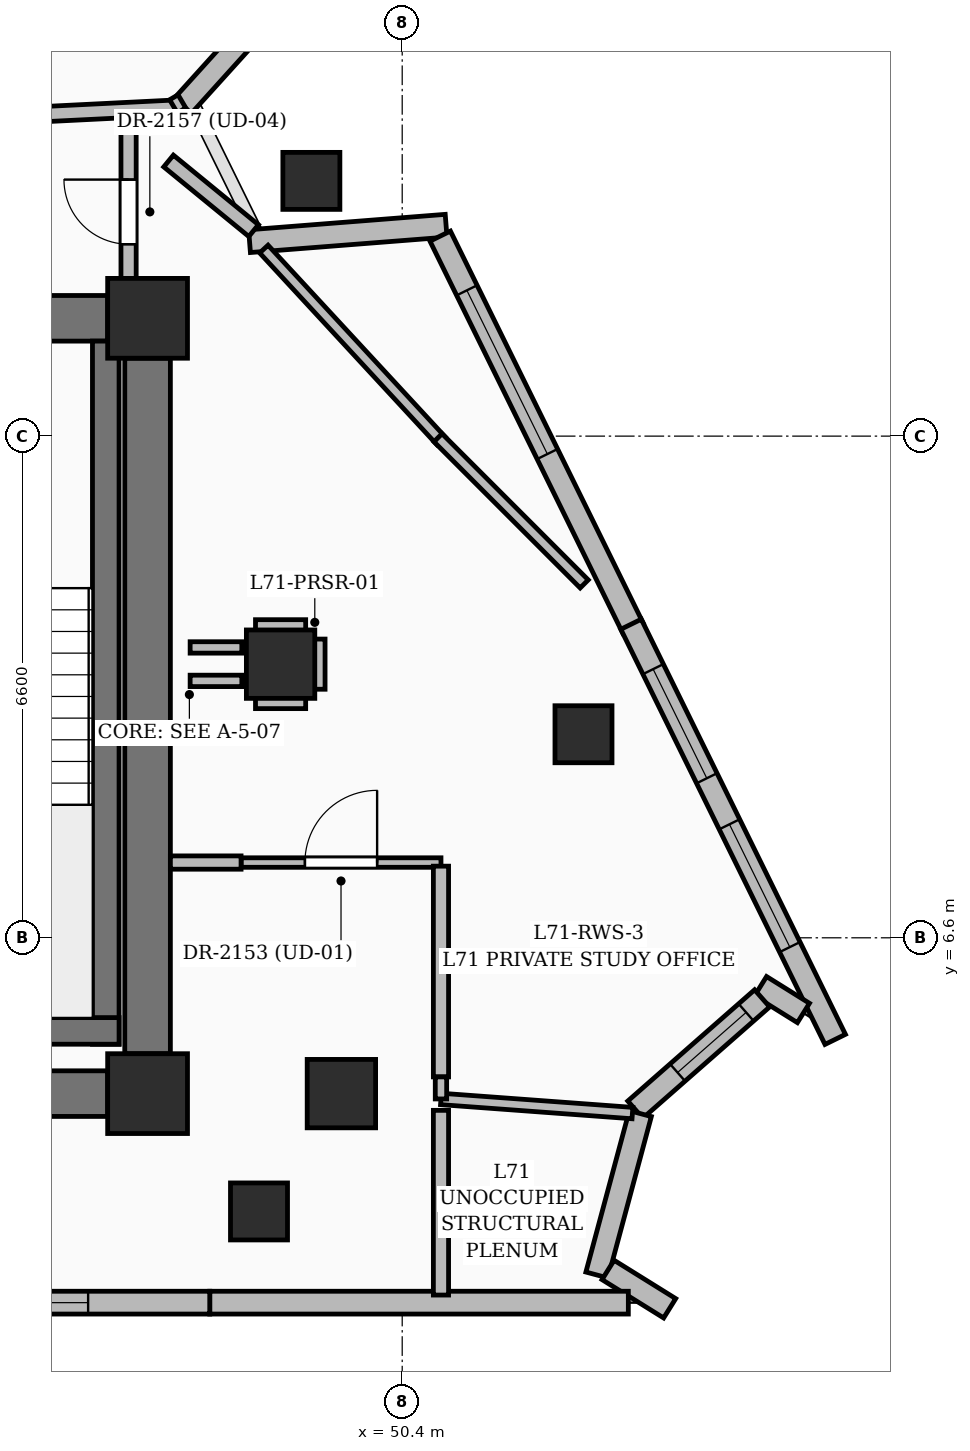
"""IFC4 building model, lengths in metres.
Left out: names, types, materials, properties, quantities, classifications, styles, units other than length and angle.
Written with IfcOpenShell. Run it as: python <this file> out.ifc"""

import sys

from ifc_helpers import new_model, si_unit, direction, frame, frame_2d, origin, origin_2d, place, context, subcontext, project, spatial, rectangle, extrude, element, fill, save


model = new_model("IFC4")
c1 = context("Model", 3, precision=1e-05, world=origin(), true_north=direction((0.0, 1.0)))
c2 = subcontext(c1, "Body", "Model", "MODEL_VIEW")
j1 = project(units=[si_unit("LENGTHUNIT", "METRE"), si_unit("PLANEANGLEUNIT", "RADIAN")], contexts=[c1])
p1 = place(None, origin())
s1 = spatial("IfcSite", under=j1, at=p1, CompositionType="ELEMENT")
p2 = place(p1, origin())
s2 = spatial("IfcBuilding", under=s1, at=p2, CompositionType="ELEMENT")
p3 = place(p2, frame((0.0, 0.0, 274.5)))
s3 = spatial("IfcBuildingStorey", under=s2, at=p3, CompositionType="ELEMENT", Elevation=274.5)
for number, where, z_axis, x_axis in (
    (1, (47.05, 4.55, 0.0), (0.0, 0.0, 1.0), (1.0, 0.0, 0.0)),
    (2, (47.05, 14.75, 0.0), (0.0, 0.0, 1.0), (1.0, 0.0, 0.0)),
):
    element("IfcColumn", number, at=place(p3, frame(where, z_axis=z_axis, x_axis=x_axis)), inside=s3, PredefinedType="COLUMN", context=c2, shape_type="SweptSolid", body=[
        extrude(rectangle(XDim=1.05, YDim=1.05, at=origin_2d()), origin(), (0.0, 0.0, 1.0), 3.75),
    ])
for number, where, z_axis, x_axis in (
    (3, (49.6, 4.55, 0.0), (0.0, 0.0, 1.0), (1.0, 0.0, 0.0)),
    (4, (48.8, 10.2, 0.0), (0.0, 0.0, 1.0), (1.0, 0.0, 0.0)),
):
    element("IfcColumn", number, at=place(p3, frame(where, z_axis=z_axis, x_axis=x_axis)), inside=s3, PredefinedType="COLUMN", context=c2, shape_type="SweptSolid", body=[
        extrude(rectangle(XDim=0.9, YDim=0.9, at=origin_2d()), origin(), (0.0, 0.0, 1.0), 3.75),
    ])
p4 = place(p3, frame((35.675, 4.55, 0.0), z_axis=(0.0, 0.0, 1.0), x_axis=(1.0, 0.0, 0.0)))
e5 = element("IfcWall", 5, at=p4, inside=s3, PredefinedType="SHEAR", context=c2, shape_type="SweptSolid", body=[
    extrude(rectangle(XDim=10.85, YDim=0.6, at=frame_2d((5.425, 0.0))), origin(), (0.0, 0.0, 1.0), 3.75),
])
p5 = place(p3, frame((35.675, 14.75, 0.0), z_axis=(0.0, 0.0, 1.0), x_axis=(1.0, 0.0, 0.0)))
e6 = element("IfcWall", 6, at=p5, inside=s3, PredefinedType="SHEAR", context=c2, shape_type="SweptSolid", body=[
    extrude(rectangle(XDim=10.85, YDim=0.6, at=frame_2d((5.425, 0.0))), origin(), (0.0, 0.0, 1.0), 3.75),
])
p6 = place(p5, frame((1.1, 0.0, 0.0)))
e7 = element("IfcOpeningElement", 7, at=p6, cuts=e6, PredefinedType="OPENING", context=c2, shape_type="SweptSolid", body=[
    extrude(rectangle(XDim=1.05, YDim=2.15, at=frame_2d((0.525, 1.075))), frame((0.0, 0.31, 0.0), z_axis=(0.0, -1.0, 0.0), x_axis=(1.0, 0.0, 0.0)), (0.0, 0.0, 1.0), 0.62),
])
p7 = place(p5, frame((8.7, 0.0, 0.0)))
e8 = element("IfcOpeningElement", 8, at=p7, cuts=e6, PredefinedType="OPENING", context=c2, shape_type="SweptSolid", body=[
    extrude(rectangle(XDim=1.05, YDim=2.15, at=frame_2d((0.525, 1.075))), frame((0.0, 0.31, 0.0), z_axis=(0.0, -1.0, 0.0), x_axis=(1.0, 0.0, 0.0)), (0.0, 0.0, 1.0), 0.62),
])
p8 = place(p5, frame((3.825, 0.0, 0.0)))
e9 = element("IfcOpeningElement", 9, at=p8, cuts=e6, PredefinedType="OPENING", context=c2, shape_type="SweptSolid", body=[
    extrude(rectangle(XDim=1.2, YDim=2.2, at=frame_2d((0.6, 1.1))), frame((0.0, 0.31, 0.0), z_axis=(0.0, -1.0, 0.0), x_axis=(1.0, 0.0, 0.0)), (0.0, 0.0, 1.0), 0.62),
])
p9 = place(p5, frame((5.825, 0.0, 0.0)))
e10 = element("IfcOpeningElement", 10, at=p9, cuts=e6, PredefinedType="OPENING", context=c2, shape_type="SweptSolid", body=[
    extrude(rectangle(XDim=1.2, YDim=2.2, at=frame_2d((0.6, 1.1))), frame((0.0, 0.31, 0.0), z_axis=(0.0, -1.0, 0.0), x_axis=(1.0, 0.0, 0.0)), (0.0, 0.0, 1.0), 0.62),
])
p10 = place(p3, frame((47.05, 5.075, 0.0), z_axis=(0.0, 0.0, 1.0), x_axis=(0.0, 1.0, 0.0)))
e11 = element("IfcWall", 11, at=p10, inside=s3, PredefinedType="SHEAR", context=c2, shape_type="SweptSolid", body=[
    extrude(rectangle(XDim=9.15, YDim=0.6, at=frame_2d((4.575, 0.0))), origin(), (0.0, 0.0, 1.0), 3.75),
])
p11 = place(p3, frame((46.5, 5.2, 0.0), z_axis=(0.0, 0.0, 1.0), x_axis=(0.0, 1.0, 0.0)))
e12 = element("IfcWall", 12, at=p11, inside=s3, PredefinedType="SOLIDWALL", context=c2, shape_type="SweptSolid", body=[
    extrude(rectangle(XDim=9.25, YDim=0.35, at=frame_2d((4.625, 0.0))), origin(), (0.0, 0.0, 1.0), 3.75),
])
p12 = place(p3, frame((43.125, 5.375, 0.0), z_axis=(0.0, 0.0, 1.0), x_axis=(1.0, 0.0, 0.0)))
e13 = element("IfcWall", 13, at=p12, inside=s3, PredefinedType="SOLIDWALL", context=c2, shape_type="SweptSolid", body=[
    extrude(rectangle(XDim=3.55, YDim=0.35, at=frame_2d((1.775, 0.0))), origin(), (0.0, 0.0, 1.0), 3.75),
])
for number, where, z_axis, x_axis in (
    (14, (48.516, 3.0, 0.0), (0.0, 0.0, 1.0), (1.0, 0.0, 0.0)),
    (15, (52.785, 9.278, 0.0), (0.0, 0.0, 1.0), (1.0, 0.0, 0.0)),
    (16, (49.205, 16.558, 0.0), (0.0, 0.0, 1.0), (1.0, 0.0, 0.0)),
):
    element("IfcColumn", number, at=place(p3, frame(where, z_axis=z_axis, x_axis=x_axis)), inside=s3, PredefinedType="COLUMN", context=c2, shape_type="SweptSolid", body=[
        extrude(rectangle(XDim=0.75, YDim=0.75, at=origin_2d()), origin(), (0.0, 0.0, 1.0), 3.75),
    ])
p13 = place(p3, frame((49.067, 19.263, 0.0), z_axis=(0.0, 0.0, 1.0), x_axis=(-0.670764114694, -0.741670750697, 0.0)))
e17 = element("IfcWall", 17, at=p13, inside=s3, PredefinedType="SOLIDWALL", context=c2, shape_type="SweptSolid", body=[
    extrude(rectangle(XDim=2.314, YDim=0.3, at=frame_2d((1.157, 0.0))), origin(), (0.0, 0.0, 1.0), 2.696),
])
p14 = place(p3, frame((48.391, 15.765, 0.0), z_axis=(0.0, 0.0, 1.0), x_axis=(0.996929740899, 0.078301288061, 0.0)))
e18 = element("IfcWall", 18, at=p14, inside=s3, PredefinedType="SOLIDWALL", context=c2, shape_type="SweptSolid", body=[
    extrude(rectangle(XDim=2.594, YDim=0.3, at=frame_2d((1.297, 0.0))), origin(), (0.0, 0.0, 1.0), 2.696),
])
p15 = place(p3, frame((50.9, 15.831, 0.0), z_axis=(0.0, 0.0, 1.0), x_axis=(0.441291621968, -0.897363752545, 0.0)))
e19 = element("IfcWall", 19, at=p15, inside=s3, PredefinedType="SOLIDWALL", context=c2, shape_type="SweptSolid", body=[
    extrude(rectangle(XDim=5.748, YDim=0.3, at=frame_2d((2.874, 0.0))), origin(), (0.0, 0.0, 1.0), 3.5),
])
p16 = place(p15, frame((0.795, 0.0, 0.6)))
e20 = element("IfcOpeningElement", 20, at=p16, cuts=e19, PredefinedType="OPENING", context=c2, shape_type="SweptSolid", body=[
    extrude(rectangle(XDim=2.4, YDim=2.1, at=frame_2d((1.2, 1.05))), frame((0.0, 0.16, 0.0), z_axis=(0.0, -1.0, 0.0), x_axis=(1.0, 0.0, 0.0)), (0.0, 0.0, 1.0), 0.32),
])
p17 = place(p3, frame((53.411, 10.725, 0.0), z_axis=(0.0, 0.0, 1.0), x_axis=(0.441283118505, -0.897367934195, 0.0)))
e21 = element("IfcWall", 21, at=p17, inside=s3, PredefinedType="SOLIDWALL", context=c2, shape_type="SweptSolid", body=[
    extrude(rectangle(XDim=6.086, YDim=0.3, at=frame_2d((3.043, 0.0))), origin(), (0.0, 0.0, 1.0), 3.5),
])
p18 = place(p17, frame((0.658, 0.0, 0.55)))
e22 = element("IfcOpeningElement", 22, at=p18, cuts=e21, PredefinedType="OPENING", context=c2, shape_type="SweptSolid", body=[
    extrude(rectangle(XDim=1.6, YDim=2.2, at=frame_2d((0.8, 1.1))), frame((0.0, 0.16, 0.0), z_axis=(0.0, -1.0, 0.0), x_axis=(1.0, 0.0, 0.0)), (0.0, 0.0, 1.0), 0.32),
])
p19 = place(p17, frame((2.933, 0.0, 0.6)))
e23 = element("IfcOpeningElement", 23, at=p19, cuts=e21, PredefinedType="OPENING", context=c2, shape_type="SweptSolid", body=[
    extrude(rectangle(XDim=1.8, YDim=2.1, at=frame_2d((0.9, 1.05))), frame((0.0, 0.16, 0.0), z_axis=(0.0, -1.0, 0.0), x_axis=(1.0, 0.0, 0.0)), (0.0, 0.0, 1.0), 0.32),
])
p20 = place(p3, frame((55.679, 5.611, 0.0), z_axis=(0.0, 0.0, 1.0), x_axis=(-0.848492759322, 0.529206989162, 0.0)))
e24 = element("IfcWall", 24, at=p20, inside=s3, PredefinedType="SOLIDWALL", context=c2, shape_type="SweptSolid", body=[
    extrude(rectangle(XDim=0.665, YDim=0.3, at=frame_2d((0.333, 0.0))), origin(), (0.0, 0.0, 1.0), 3.5),
])
p21 = place(p3, frame((55.135, 5.803, 0.0), z_axis=(0.0, 0.0, 1.0), x_axis=(-0.751744762281, -0.659454177622, 0.0)))
e25 = element("IfcWall", 25, at=p21, inside=s3, PredefinedType="SOLIDWALL", context=c2, shape_type="SweptSolid", body=[
    extrude(rectangle(XDim=2.219, YDim=0.3, at=frame_2d((1.11, 0.0))), origin(), (0.0, 0.0, 1.0), 3.5),
])
p22 = place(p21, frame((0.28, 0.0, 0.8)))
e26 = element("IfcOpeningElement", 26, at=p22, cuts=e25, PredefinedType="OPENING", context=c2, shape_type="SweptSolid", body=[
    extrude(rectangle(XDim=1.2, YDim=1.8, at=frame_2d((0.6, 0.9))), frame((0.0, 0.16, 0.0), z_axis=(0.0, -1.0, 0.0), x_axis=(1.0, 0.0, 0.0)), (0.0, 0.0, 1.0), 0.32),
])
p23 = place(p3, frame((53.533, 4.287, 0.0), z_axis=(0.0, 0.0, 1.0), x_axis=(-0.259818176463, -0.965657555855, 0.0)))
e27 = element("IfcWall", 27, at=p23, inside=s3, PredefinedType="SOLIDWALL", context=c2, shape_type="SweptSolid", body=[
    extrude(rectangle(XDim=2.199, YDim=0.3, at=frame_2d((1.099, 0.0))), origin(), (0.0, 0.0, 1.0), 3.5),
])
p24 = place(p3, frame((53.108, 2.23, 0.0), z_axis=(0.0, 0.0, 1.0), x_axis=(0.849031111495, -0.528342854322, 0.0)))
e28 = element("IfcWall", 28, at=p24, inside=s3, PredefinedType="SOLIDWALL", context=c2, shape_type="SweptSolid", body=[
    extrude(rectangle(XDim=0.955, YDim=0.3, at=frame_2d((0.477, 0.0))), origin(), (0.0, 0.0, 1.0), 3.5),
])
p25 = place(p3, frame((53.375, 1.8, 0.0), z_axis=(0.0, 0.0, 1.0), x_axis=(-1.0, 0.0, 0.0)))
e29 = element("IfcWall", 29, at=p25, inside=s3, PredefinedType="SOLIDWALL", context=c2, shape_type="SweptSolid", body=[
    extrude(rectangle(XDim=5.507, YDim=0.3, at=frame_2d((2.753, 0.0))), origin(), (0.0, 0.0, 1.0), 3.5),
])
p26 = place(p3, frame((47.868, 1.8, 0.0), z_axis=(0.0, 0.0, 1.0), x_axis=(-1.0, 0.0, 0.0)))
e30 = element("IfcWall", 30, at=p26, inside=s3, PredefinedType="SOLIDWALL", context=c2, shape_type="SweptSolid", body=[
    extrude(rectangle(XDim=6.072, YDim=0.3, at=frame_2d((3.036, 0.0))), origin(), (0.0, 0.0, 1.0), 3.5),
])
p27 = place(p26, frame((1.6, 0.0, 0.55)))
e31 = element("IfcOpeningElement", 31, at=p27, cuts=e30, PredefinedType="OPENING", context=c2, shape_type="SweptSolid", body=[
    extrude(rectangle(XDim=2.1, YDim=2.4, at=frame_2d((1.05, 1.2))), frame((0.0, 0.16, 0.0), z_axis=(0.0, -1.0, 0.0), x_axis=(1.0, 0.0, 0.0)), (0.0, 0.0, 1.0), 0.32),
])
p28 = place(p3, frame((46.8, 15.05, 0.0), z_axis=(0.0, 0.0, 1.0), x_axis=(0.0, 1.0, 0.0)))
e32 = element("IfcWall", 32, at=p28, inside=s3, PredefinedType="PARTITIONING", context=c2, shape_type="SweptSolid", body=[
    extrude(rectangle(XDim=2.2, YDim=0.2, at=frame_2d((1.1, 0.0))), origin(), (0.0, 0.0, 1.0), 2.685),
])
p29 = place(p28, frame((0.675, 0.0, 0.0)))
e33 = element("IfcOpeningElement", 33, at=p29, cuts=e32, PredefinedType="OPENING", context=c2, shape_type="SweptSolid", body=[
    extrude(rectangle(XDim=0.85, YDim=2.1, at=frame_2d((0.425, 1.05))), frame((0.0, 0.11, 0.0), z_axis=(0.0, -1.0, 0.0), x_axis=(1.0, 0.0, 0.0)), (0.0, 0.0, 1.0), 0.22),
])
p30 = place(p3, frame((47.41, 17.522, 0.0), z_axis=(0.0, 0.0, 1.0), x_axis=(-0.998761311764, -0.049757834795, 0.0)))
e34 = element("IfcWall", 34, at=p30, inside=s3, PredefinedType="PARTITIONING", context=c2, shape_type="SweptSolid", body=[
    extrude(rectangle(XDim=3.454, YDim=0.2, at=frame_2d((1.727, 0.0))), origin(), (0.0, 0.0, 1.0), 2.685),
])
p31 = place(p30, frame((1.762, 0.0, 0.0)))
e35 = element("IfcOpeningElement", 35, at=p31, cuts=e34, PredefinedType="OPENING", context=c2, shape_type="SweptSolid", body=[
    extrude(rectangle(XDim=0.9, YDim=2.1, at=frame_2d((0.45, 1.05))), frame((0.0, 0.11, 0.0), z_axis=(0.0, -1.0, 0.0), x_axis=(1.0, 0.0, 0.0)), (0.0, 0.0, 1.0), 0.22),
])
p32 = place(p3, frame((48.28, 7.59, 0.0), z_axis=(0.0, 0.0, 1.0), x_axis=(1.0, 0.0, 0.0)))
e36 = element("IfcWall", 36, at=p32, inside=s3, PredefinedType="PARTITIONING", context=c2, shape_type="SweptSolid", body=[
    extrude(rectangle(XDim=2.63, YDim=0.125, at=frame_2d((1.315, 0.0))), origin(), (0.0, 0.0, 1.0), 3.5),
])
p33 = place(p32, frame((0.84, 0.0, 0.0)))
e37 = element("IfcOpeningElement", 37, at=p33, cuts=e36, PredefinedType="OPENING", context=c2, shape_type="SweptSolid", body=[
    extrude(rectangle(XDim=0.95, YDim=2.2, at=frame_2d((0.475, 1.1))), frame((0.0, 0.072, 0.0), z_axis=(0.0, -1.0, 0.0), x_axis=(1.0, 0.0, 0.0)), (0.0, 0.0, 1.0), 0.145),
])
p34 = place(p3, frame((48.445, 15.904, 0.0), z_axis=(0.0, 0.0, 1.0), x_axis=(-0.773866992192, 0.633348149437, 0.0)))
e38 = element("IfcWall", 38, at=p34, inside=s3, PredefinedType="PARTITIONING", context=c2, shape_type="SweptSolid", body=[
    extrude(rectangle(XDim=1.446, YDim=0.2, at=frame_2d((0.723, 0.0))), origin(), (0.0, 0.0, 1.0), 2.835),
])
p35 = place(p3, frame((50.91, 4.77, 0.0), z_axis=(0.0, 0.0, 1.0), x_axis=(0.0, 1.0, 0.0)))
e39 = element("IfcWall", 39, at=p35, inside=s3, PredefinedType="PARTITIONING", context=c2, shape_type="SweptSolid", body=[
    extrude(rectangle(XDim=2.772, YDim=0.2, at=frame_2d((1.386, 0.0))), origin(), (0.0, 0.0, 1.0), 2.691),
])
p36 = place(p3, frame((50.91, 1.9, 0.0), z_axis=(0.0, 0.0, 1.0), x_axis=(0.0, 1.0, 0.0)))
e40 = element("IfcWall", 40, at=p36, inside=s3, PredefinedType="PARTITIONING", context=c2, shape_type="SweptSolid", body=[
    extrude(rectangle(XDim=2.43, YDim=0.2, at=frame_2d((1.215, 0.0))), origin(), (0.0, 0.0, 1.0), 3.5),
])
p37 = place(p3, frame((50.91, 4.48, 0.0), z_axis=(0.0, 0.0, 1.0), x_axis=(0.997284080905, -0.073650946855, 0.0)))
e41 = element("IfcWall", 41, at=p37, inside=s3, PredefinedType="PARTITIONING", context=c2, shape_type="SweptSolid", body=[
    extrude(rectangle(XDim=2.526, YDim=0.15, at=frame_2d((1.263, 0.0))), origin(), (0.0, 0.0, 1.0), 3.5),
])
p38 = place(p3, frame((47.502, 17.604, 0.0), z_axis=(0.0, 0.0, 1.0), x_axis=(-0.862812312463, -0.505524394527, 0.0)))
e42 = element("IfcWall", 42, at=p38, inside=s3, PredefinedType="PARTITIONING", context=c2, shape_type="SweptSolid", body=[
    extrude(rectangle(XDim=0.128, YDim=0.2, at=frame_2d((0.064, 0.0))), origin(), (0.0, 0.0, 1.0), 2.685),
])
p39 = place(p3, frame((47.35, 7.59, 0.0), z_axis=(0.0, 0.0, 1.0), x_axis=(1.0, 0.0, 0.0)))
e43 = element("IfcWall", 43, at=p39, inside=s3, PredefinedType="PARTITIONING", context=c2, shape_type="SweptSolid", body=[
    extrude(rectangle(XDim=0.93, YDim=0.175, at=frame_2d((0.465, 0.0))), origin(), (0.0, 0.0, 1.0), 2.685),
])
p40 = place(p3, frame((47.61, 10.42, 0.0), z_axis=(0.0, 0.0, 1.0), x_axis=(1.0, 0.0, 0.0)))
e44 = element("IfcWall", 44, at=p40, inside=s3, PredefinedType="PARTITIONING", context=c2, shape_type="SweptSolid", body=[
    extrude(rectangle(XDim=0.68, YDim=0.15, at=frame_2d((0.34, 0.0))), origin(), (0.0, 0.0, 1.0), 3.5),
])
p41 = place(p3, frame((48.47, 10.71, 0.0), z_axis=(0.0, 0.0, 1.0), x_axis=(1.0, 0.0, 0.0)))
e45 = element("IfcWall", 45, at=p41, inside=s3, PredefinedType="PARTITIONING", context=c2, shape_type="SweptSolid", body=[
    extrude(rectangle(XDim=0.66, YDim=0.15, at=frame_2d((0.33, 0.0))), origin(), (0.0, 0.0, 1.0), 3.5),
])
p42 = place(p3, frame((49.31, 10.53, 0.0), z_axis=(0.0, 0.0, 1.0), x_axis=(0.0, -1.0, 0.0)))
e46 = element("IfcWall", 46, at=p42, inside=s3, PredefinedType="PARTITIONING", context=c2, shape_type="SweptSolid", body=[
    extrude(rectangle(XDim=0.66, YDim=0.15, at=frame_2d((0.33, 0.0))), origin(), (0.0, 0.0, 1.0), 2.835),
])
p43 = place(p3, frame((49.13, 9.69, 0.0), z_axis=(0.0, 0.0, 1.0), x_axis=(-1.0, 0.0, 0.0)))
e47 = element("IfcWall", 47, at=p43, inside=s3, PredefinedType="PARTITIONING", context=c2, shape_type="SweptSolid", body=[
    extrude(rectangle(XDim=0.66, YDim=0.15, at=frame_2d((0.33, 0.0))), origin(), (0.0, 0.0, 1.0), 2.685),
])
p44 = place(p3, frame((48.29, 9.98, 0.0), z_axis=(0.0, 0.0, 1.0), x_axis=(-1.0, 0.0, 0.0)))
e48 = element("IfcWall", 48, at=p44, inside=s3, PredefinedType="PARTITIONING", context=c2, shape_type="SweptSolid", body=[
    extrude(rectangle(XDim=0.68, YDim=0.15, at=frame_2d((0.34, 0.0))), origin(), (0.0, 0.0, 1.0), 3.5),
])
p45 = place(p3, frame((50.91, 4.77, 0.0), z_axis=(0.0, 0.0, 1.0), x_axis=(0.0, -1.0, 0.0)))
e49 = element("IfcWall", 49, at=p45, inside=s3, PredefinedType="PARTITIONING", context=c2, shape_type="SweptSolid", body=[
    extrude(rectangle(XDim=0.29, YDim=0.15, at=frame_2d((0.145, 0.0))), origin(), (0.0, 0.0, 1.0), 3.5),
])
p46 = place(p3, frame((50.91, 13.14, 0.0), z_axis=(0.0, 0.0, 1.0), x_axis=(-0.678714212845, 0.734402489976, 0.0)))
e50 = element("IfcWall", 50, at=p46, inside=s3, PredefinedType="PARTITIONING", context=c2, shape_type="SweptSolid", body=[
    extrude(rectangle(XDim=3.433, YDim=0.15, at=frame_2d((1.716, 0.0))), origin(), (0.0, 0.0, 1.0), 2.691),
])
p47 = place(p3, frame((52.794, 11.256, 0.0), z_axis=(0.0, 0.0, 1.0), x_axis=(-0.707106781187, 0.707106781187, 0.0)))
e51 = element("IfcWall", 51, at=p47, inside=s3, PredefinedType="PARTITIONING", context=c2, shape_type="SweptSolid", body=[
    extrude(rectangle(XDim=2.72, YDim=0.15, at=frame_2d((1.36, 0.0))), origin(), (0.0, 0.0, 1.0), 3.5),
])
p48 = place(p16, origin())
e52 = element("IfcWindow", 52, at=p48, inside=s3, PartitioningType="SINGLE_PANEL", PredefinedType="WINDOW", context=c2, shape_type="SweptSolid", body=[
    extrude(rectangle(XDim=2.4, YDim=2.1, at=frame_2d((1.2, 1.05))), frame((0.0, 0.03, 0.0), z_axis=(0.0, -1.0, 0.0), x_axis=(1.0, 0.0, 0.0)), (0.0, 0.0, 1.0), 0.06),
])
fill(e20, e52)
p49 = place(p18, origin())
e53 = element("IfcWindow", 53, at=p49, inside=s3, PartitioningType="SINGLE_PANEL", PredefinedType="WINDOW", context=c2, shape_type="SweptSolid", body=[
    extrude(rectangle(XDim=1.6, YDim=2.2, at=frame_2d((0.8, 1.1))), frame((0.0, 0.03, 0.0), z_axis=(0.0, -1.0, 0.0), x_axis=(1.0, 0.0, 0.0)), (0.0, 0.0, 1.0), 0.06),
])
fill(e22, e53)
p50 = place(p19, origin())
e54 = element("IfcWindow", 54, at=p50, inside=s3, PartitioningType="SINGLE_PANEL", PredefinedType="WINDOW", context=c2, shape_type="SweptSolid", body=[
    extrude(rectangle(XDim=1.8, YDim=2.1, at=frame_2d((0.9, 1.05))), frame((0.0, 0.03, 0.0), z_axis=(0.0, -1.0, 0.0), x_axis=(1.0, 0.0, 0.0)), (0.0, 0.0, 1.0), 0.06),
])
fill(e23, e54)
p51 = place(p22, origin())
e55 = element("IfcWindow", 55, at=p51, inside=s3, PartitioningType="SINGLE_PANEL", PredefinedType="WINDOW", context=c2, shape_type="SweptSolid", body=[
    extrude(rectangle(XDim=1.2, YDim=1.8, at=frame_2d((0.6, 0.9))), frame((0.0, 0.03, 0.0), z_axis=(0.0, -1.0, 0.0), x_axis=(1.0, 0.0, 0.0)), (0.0, 0.0, 1.0), 0.06),
])
fill(e26, e55)
p52 = place(p27, origin())
e56 = element("IfcWindow", 56, at=p52, inside=s3, PartitioningType="SINGLE_PANEL", PredefinedType="WINDOW", context=c2, shape_type="SweptSolid", body=[
    extrude(rectangle(XDim=2.1, YDim=2.4, at=frame_2d((1.05, 1.2))), frame((0.0, 0.03, 0.0), z_axis=(0.0, -1.0, 0.0), x_axis=(1.0, 0.0, 0.0)), (0.0, 0.0, 1.0), 0.06),
])
fill(e31, e56)
p53 = place(p33, origin())
e57 = element("IfcDoor", 57, at=p53, inside=s3, OperationType="SINGLE_SWING_RIGHT", PredefinedType="DOOR", context=c2, shape_type="SweptSolid", body=[
    extrude(rectangle(XDim=0.95, YDim=2.2, at=frame_2d((0.475, 1.1))), frame((0.0, 0.025, 0.0), z_axis=(0.0, -1.0, 0.0), x_axis=(1.0, 0.0, 0.0)), (0.0, 0.0, 1.0), 0.05),
])
fill(e37, e57)
p54 = place(p29, origin())
e58 = element("IfcDoor", 58, at=p54, inside=s3, OperationType="SINGLE_SWING_RIGHT", PredefinedType="DOOR", context=c2, shape_type="SweptSolid", body=[
    extrude(rectangle(XDim=0.85, YDim=2.1, at=frame_2d((0.425, 1.05))), frame((0.0, 0.025, 0.0), z_axis=(0.0, -1.0, 0.0), x_axis=(1.0, 0.0, 0.0)), (0.0, 0.0, 1.0), 0.05),
])
fill(e33, e58)
save(model, sys.argv[1])
